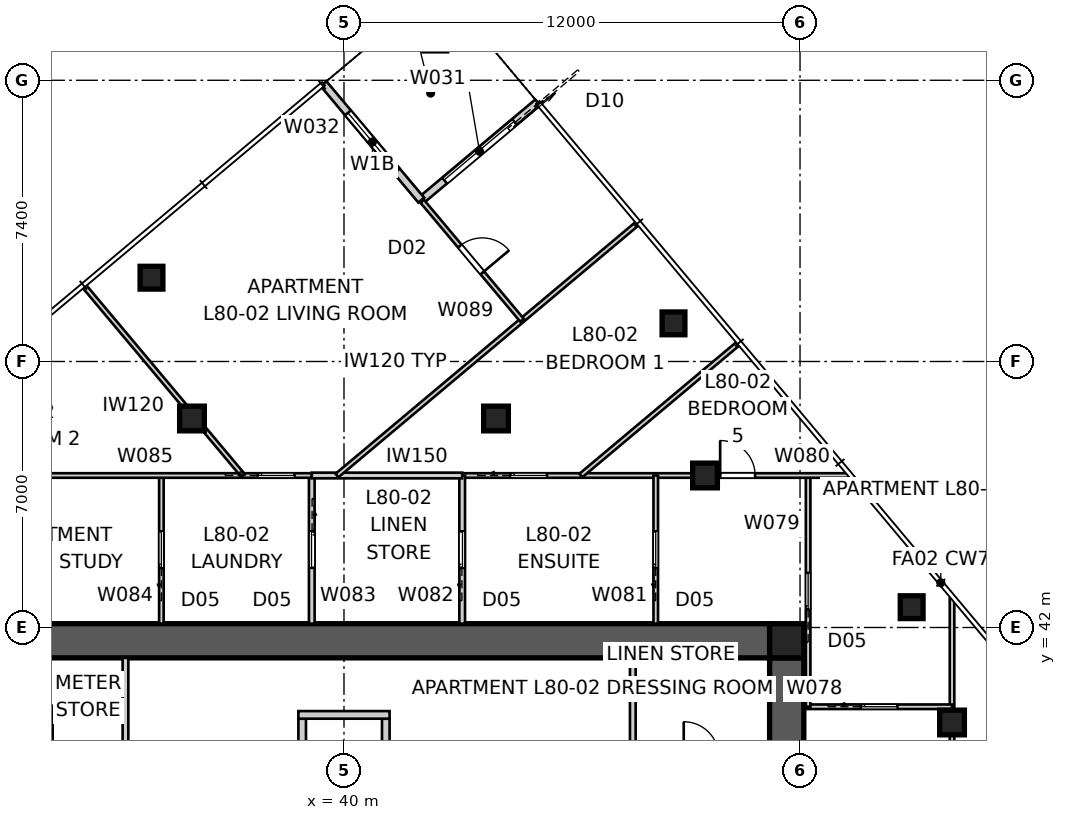
"""IFC4 building model, lengths in metres.
Left out: names, types, materials, properties, quantities, classifications, styles, units other than length and angle.
Written with IfcOpenShell. Run it as: python <this file> out.ifc"""

import sys

from ifc_helpers import new_model, si_unit, direction, frame, frame_2d, origin, origin_2d, place, context, subcontext, project, spatial, polyline, rectangle, outline, extrude, element, fill, save


model = new_model("IFC4")
c1 = context("Model", 3, precision=1e-05, world=origin(), true_north=direction((0.0, 1.0)))
c2 = subcontext(c1, "Body", "Model", "MODEL_VIEW")
j1 = project(units=[si_unit("LENGTHUNIT", "METRE"), si_unit("PLANEANGLEUNIT", "RADIAN")], contexts=[c1])
p1 = place(None, origin())
s1 = spatial("IfcSite", under=j1, at=p1, CompositionType="ELEMENT")
p2 = place(p1, origin())
s2 = spatial("IfcBuilding", under=s1, at=p2, CompositionType="ELEMENT")
p3 = place(p2, frame((0.0, 0.0, 289.6)))
s3 = spatial("IfcBuildingStorey", under=s2, at=p3, CompositionType="ELEMENT", Elevation=289.6)
p4 = place(p3, frame((28.8, 41.65, 0.0), z_axis=(0.0, 0.0, 1.0), x_axis=(1.0, 0.0, 0.0)))
e1 = element("IfcWall", 1, at=p4, inside=s3, PredefinedType="SHEAR", context=c2, shape_type="SweptSolid", body=[
    extrude(outline(polyline([(0.0, -0.45), (22.4, -0.45), (22.4, -0.025), (22.85, -0.025), (22.85, 0.025), (22.4, 0.025), (22.4, 0.45), (0.0, 0.45), (0.0, 0.025), (-0.45, 0.025), (-0.45, -0.025), (0.0, -0.025), (0.0, -0.45)])), origin(), (0.0, 0.0, 1.0), 3.4),
])
p5 = place(p3, frame((51.65, 18.8, 0.0), z_axis=(0.0, 0.0, 1.0), x_axis=(0.0, 1.0, 0.0)))
e2 = element("IfcWall", 2, at=p5, inside=s3, PredefinedType="SHEAR", context=c2, shape_type="SweptSolid", body=[
    extrude(outline(polyline([(0.0, -0.45), (22.4, -0.45), (22.4, -0.025), (22.85, -0.025), (22.85, 0.025), (22.4, 0.025), (22.4, 0.45), (0.0, 0.45), (0.0, 0.025), (-0.45, 0.025), (-0.45, -0.025), (0.0, -0.025), (0.0, -0.45)])), origin(), (0.0, 0.0, 1.0), 3.4),
])
p6 = place(p5, frame((11.14, 0.0, 0.0)))
e3 = element("IfcOpeningElement", 3, at=p6, cuts=e2, PredefinedType="OPENING", context=c2, shape_type="SweptSolid", body=[
    extrude(rectangle(XDim=1.02, YDim=2.4, at=frame_2d((0.51, 1.2))), frame((0.0, 0.46, 0.0), z_axis=(0.0, -1.0, 0.0), x_axis=(1.0, 0.0, 0.0)), (0.0, 0.0, 1.0), 0.92),
])
for number, where, z_axis, x_axis in (
    (4, (38.9, 37.6, 0.0), (0.0, 0.0, 1.0), (0.0, 1.0, 0.0)),
    (5, (41.1, 37.6, 0.0), (0.0, 0.0, 1.0), (0.0, 1.0, 0.0)),
):
    element("IfcWall", number, at=place(p3, frame(where, z_axis=z_axis, x_axis=x_axis)), inside=s3, PredefinedType="SOLIDWALL", context=c2, shape_type="SweptSolid", body=[
        extrude(rectangle(XDim=2.0, YDim=0.2, at=frame_2d((1.0, 0.0))), origin(), (0.0, 0.0, 1.0), 3.4),
    ])
p7 = place(p3, frame((38.8, 39.7, 0.0), z_axis=(0.0, 0.0, 1.0), x_axis=(1.0, 0.0, 0.0)))
e6 = element("IfcWall", 6, at=p7, inside=s3, PredefinedType="SOLIDWALL", context=c2, shape_type="SweptSolid", body=[
    extrude(rectangle(XDim=2.4, YDim=0.2, at=frame_2d((1.2, 0.0))), origin(), (0.0, 0.0, 1.0), 3.4),
])
p8 = place(p3, frame((51.65, 41.65, 0.0), z_axis=(0.0, 0.0, 1.0), x_axis=(1.0, 0.0, 0.0)))
e7 = element("IfcColumn", 7, at=p8, inside=s3, PredefinedType="COLUMN", context=c2, shape_type="SweptSolid", body=[
    extrude(rectangle(XDim=0.9, YDim=0.9, at=origin_2d()), origin(), (0.0, 0.0, 1.0), 3.4),
])
for number, where, z_axis, x_axis in (
    (8, (54.938, 42.534, 0.0), (0.0, 0.0, 1.0), (1.0, 0.0, 0.0)),
    (9, (48.671, 50.003, 0.0), (0.0, 0.0, 1.0), (1.0, 0.0, 0.0)),
    (10, (34.935, 51.205, 0.0), (0.0, 0.0, 1.0), (1.0, 0.0, 0.0)),
):
    element("IfcColumn", number, at=place(p3, frame(where, z_axis=z_axis, x_axis=x_axis)), inside=s3, PredefinedType="COLUMN", context=c2, shape_type="SweptSolid", body=[
        extrude(rectangle(XDim=0.6, YDim=0.6, at=origin_2d()), origin(), (0.0, 0.0, 1.0), 3.4),
    ])
for number, where, z_axis, x_axis in (
    (11, (56.0, 39.5, 0.0), (0.0, 0.0, 1.0), (1.0, 0.0, 0.0)),
    (12, (49.5, 46.0, 0.0), (0.0, 0.0, 1.0), (1.0, 0.0, 0.0)),
    (13, (44.0, 47.5, 0.0), (0.0, 0.0, 1.0), (1.0, 0.0, 0.0)),
    (14, (36.0, 47.5, 0.0), (0.0, 0.0, 1.0), (1.0, 0.0, 0.0)),
):
    element("IfcColumn", number, at=place(p3, frame(where, z_axis=z_axis, x_axis=x_axis)), inside=s3, PredefinedType="COLUMN", context=c2, shape_type="SweptSolid", body=[
        extrude(rectangle(XDim=0.65, YDim=0.65, at=origin_2d()), origin(), (0.0, 0.0, 1.0), 3.4),
    ])
p9 = place(p3, frame((45.098, 55.817, 0.0), z_axis=(0.0, 0.0, 1.0), x_axis=(-0.766060656284, -0.642768287094, 0.0)))
e15 = element("IfcWall", 15, at=p9, inside=s3, PredefinedType="SOLIDWALL", context=c2, shape_type="SweptSolid", body=[
    extrude(rectangle(XDim=4.0, YDim=0.2, at=frame_2d((2.0, 0.0))), origin(), (0.0, 0.0, 1.0), 3.25),
])
p10 = place(p9, frame((0.8, 0.0, 0.0)))
e16 = element("IfcOpeningElement", 16, at=p10, cuts=e15, PredefinedType="OPENING", context=c2, shape_type="SweptSolid", body=[
    extrude(rectangle(XDim=2.4, YDim=2.4, at=frame_2d((1.2, 1.2))), frame((0.0, 0.11, 0.0), z_axis=(0.0, -1.0, 0.0), x_axis=(1.0, 0.0, 0.0)), (0.0, 0.0, 1.0), 0.22),
])
p11 = place(p3, frame((42.034, 53.246, 0.0), z_axis=(0.0, 0.0, 1.0), x_axis=(-0.642798342015, 0.766035437498, 0.0)))
e17 = element("IfcWall", 17, at=p11, inside=s3, PredefinedType="SOLIDWALL", context=c2, shape_type="SweptSolid", body=[
    extrude(rectangle(XDim=4.0, YDim=0.2, at=frame_2d((2.0, 0.0))), origin(), (0.0, 0.0, 1.0), 3.25),
])
p12 = place(p11, frame((1.0, 0.0, 0.45)))
e18 = element("IfcOpeningElement", 18, at=p12, cuts=e17, PredefinedType="OPENING", context=c2, shape_type="SweptSolid", body=[
    extrude(rectangle(XDim=2.0, YDim=1.8, at=frame_2d((1.0, 0.9))), frame((0.0, 0.11, 0.0), z_axis=(0.0, -1.0, 0.0), x_axis=(1.0, 0.0, 0.0)), (0.0, 0.0, 1.0), 0.22),
])
p13 = place(p3, frame((34.25, 41.2, 0.0), z_axis=(0.0, 0.0, 1.0), x_axis=(0.0, -1.0, 0.0)))
e19 = element("IfcWall", 19, at=p13, inside=s3, PredefinedType="SOLIDWALL", context=c2, shape_type="SweptSolid", body=[
    extrude(rectangle(XDim=5.95, YDim=0.15, at=frame_2d((2.975, 0.0))), origin(), (0.0, 0.0, 1.0), 3.25),
])
p14 = place(p13, frame((2.515, 0.0, 0.0)))
e20 = element("IfcOpeningElement", 20, at=p14, cuts=e19, PredefinedType="OPENING", context=c2, shape_type="SweptSolid", body=[
    extrude(rectangle(XDim=0.92, YDim=2.1, at=frame_2d((0.46, 1.05))), frame((0.0, 0.085, 0.0), z_axis=(0.0, -1.0, 0.0), x_axis=(1.0, 0.0, 0.0)), (0.0, 0.0, 1.0), 0.17),
])
p15 = place(p3, frame((47.6, 41.2, 0.0), z_axis=(0.0, 0.0, 1.0), x_axis=(0.0, -1.0, 0.0)))
e21 = element("IfcWall", 21, at=p15, inside=s3, PredefinedType="SOLIDWALL", context=c2, shape_type="SweptSolid", body=[
    extrude(rectangle(XDim=5.9, YDim=0.15, at=frame_2d((2.95, 0.0))), origin(), (0.0, 0.0, 1.0), 3.25),
])
p16 = place(p3, frame((56.0, 42.762, 0.0), z_axis=(0.0, 0.0, 1.0), x_axis=(0.0, -1.0, 0.0)))
e22 = element("IfcWall", 22, at=p16, inside=s3, PredefinedType="PARTITIONING", context=c2, shape_type="SweptSolid", body=[
    extrude(rectangle(XDim=18.995, YDim=0.12, at=frame_2d((9.498, 0.0))), origin(), (0.0, 0.0, 1.0), 2.55),
])
p17 = place(p16, frame((17.238, 0.0, 0.0)))
e23 = element("IfcOpeningElement", 23, at=p17, cuts=e22, PredefinedType="OPENING", context=c2, shape_type="SweptSolid", body=[
    extrude(rectangle(XDim=0.92, YDim=2.34, at=frame_2d((0.46, 1.17))), frame((0.0, 0.07, 0.0), z_axis=(0.0, -1.0, 0.0), x_axis=(1.0, 0.0, 0.0)), (0.0, 0.0, 1.0), 0.14),
])
p18 = place(p16, frame((6.017, 0.0, 0.0)))
e24 = element("IfcOpeningElement", 24, at=p18, cuts=e22, PredefinedType="OPENING", context=c2, shape_type="SweptSolid", body=[
    extrude(rectangle(XDim=0.92, YDim=2.34, at=frame_2d((0.46, 1.17))), frame((0.0, 0.07, 0.0), z_axis=(0.0, -1.0, 0.0), x_axis=(1.0, 0.0, 0.0)), (0.0, 0.0, 1.0), 0.14),
])
p19 = place(p3, frame((52.163, 39.914, 0.0), z_axis=(0.0, 0.0, 1.0), x_axis=(1.0, 0.0, 0.0)))
e25 = element("IfcWall", 25, at=p19, inside=s3, PredefinedType="PARTITIONING", context=c2, shape_type="SweptSolid", body=[
    extrude(rectangle(XDim=3.837, YDim=0.12, at=frame_2d((1.918, 0.0))), origin(), (0.0, 0.0, 1.0), 3.25),
])
p20 = place(p19, frame((1.438, 0.0, 0.0)))
e26 = element("IfcOpeningElement", 26, at=p20, cuts=e25, PredefinedType="OPENING", context=c2, shape_type="SweptSolid", body=[
    extrude(rectangle(XDim=0.96, YDim=2.1, at=frame_2d((0.48, 1.05))), frame((0.0, 0.07, 0.0), z_axis=(0.0, -1.0, 0.0), x_axis=(1.0, 0.0, 0.0)), (0.0, 0.0, 1.0), 0.14),
])
p21 = place(p3, frame((52.213, 39.914, 0.0), z_axis=(0.0, 0.0, 1.0), x_axis=(0.0, 1.0, 0.0)))
e27 = element("IfcWall", 27, at=p21, inside=s3, PredefinedType="PARTITIONING", context=c2, shape_type="SweptSolid", body=[
    extrude(rectangle(XDim=6.086, YDim=0.12, at=frame_2d((3.043, 0.0))), origin(), (0.0, 0.0, 1.0), 3.25),
])
p22 = place(p21, frame((2.563, 0.0, 0.0)))
e28 = element("IfcOpeningElement", 28, at=p22, cuts=e27, PredefinedType="OPENING", context=c2, shape_type="SweptSolid", body=[
    extrude(rectangle(XDim=0.96, YDim=2.1, at=frame_2d((0.48, 1.05))), frame((0.0, 0.07, 0.0), z_axis=(0.0, -1.0, 0.0), x_axis=(1.0, 0.0, 0.0)), (0.0, 0.0, 1.0), 0.14),
])
p23 = place(p3, frame((43.11, 46.0, 0.0), z_axis=(0.0, 0.0, 1.0), x_axis=(1.0, 0.0, 0.0)))
e29 = element("IfcWall", 29, at=p23, inside=s3, PredefinedType="PARTITIONING", context=c2, shape_type="SweptSolid", body=[
    extrude(rectangle(XDim=10.173, YDim=0.12, at=frame_2d((5.086, 0.0))), origin(), (0.0, 0.0, 1.0), 2.55),
])
p24 = place(p23, frame((6.788, 0.0, 0.0)))
e30 = element("IfcOpeningElement", 30, at=p24, cuts=e29, PredefinedType="OPENING", context=c2, shape_type="SweptSolid", body=[
    extrude(rectangle(XDim=0.92, YDim=2.34, at=frame_2d((0.46, 1.17))), frame((0.0, 0.07, 0.0), z_axis=(0.0, -1.0, 0.0), x_axis=(1.0, 0.0, 0.0)), (0.0, 0.0, 1.0), 0.14),
])
p25 = place(p23, frame((1.271, 0.0, 0.0)))
e31 = element("IfcOpeningElement", 31, at=p25, cuts=e29, PredefinedType="OPENING", context=c2, shape_type="SweptSolid", body=[
    extrude(rectangle(XDim=0.96, YDim=2.1, at=frame_2d((0.48, 1.05))), frame((0.0, 0.07, 0.0), z_axis=(0.0, -1.0, 0.0), x_axis=(1.0, 0.0, 0.0)), (0.0, 0.0, 1.0), 0.14),
])
p26 = place(p3, frame((48.203, 42.1, 0.0), z_axis=(0.0, 0.0, 1.0), x_axis=(0.0, 1.0, 0.0)))
e32 = element("IfcWall", 32, at=p26, inside=s3, PredefinedType="PARTITIONING", context=c2, shape_type="SweptSolid", body=[
    extrude(rectangle(XDim=3.9, YDim=0.12, at=frame_2d((1.95, 0.0))), origin(), (0.0, 0.0, 1.0), 3.25),
])
p27 = place(p26, frame((1.47, 0.0, 0.0)))
e33 = element("IfcOpeningElement", 33, at=p27, cuts=e32, PredefinedType="OPENING", context=c2, shape_type="SweptSolid", body=[
    extrude(rectangle(XDim=0.96, YDim=2.1, at=frame_2d((0.48, 1.05))), frame((0.0, 0.07, 0.0), z_axis=(0.0, -1.0, 0.0), x_axis=(1.0, 0.0, 0.0)), (0.0, 0.0, 1.0), 0.14),
])
p28 = place(p3, frame((43.11, 42.1, 0.0), z_axis=(0.0, 0.0, 1.0), x_axis=(0.0, 1.0, 0.0)))
e34 = element("IfcWall", 34, at=p28, inside=s3, PredefinedType="SOLIDWALL", context=c2, shape_type="SweptSolid", body=[
    extrude(rectangle(XDim=3.9, YDim=0.15, at=frame_2d((1.95, 0.0))), origin(), (0.0, 0.0, 1.0), 3.25),
])
p29 = place(p28, frame((1.47, 0.0, 0.0)))
e35 = element("IfcOpeningElement", 35, at=p29, cuts=e34, PredefinedType="OPENING", context=c2, shape_type="SweptSolid", body=[
    extrude(rectangle(XDim=0.96, YDim=2.1, at=frame_2d((0.48, 1.05))), frame((0.0, 0.085, 0.0), z_axis=(0.0, -1.0, 0.0), x_axis=(1.0, 0.0, 0.0)), (0.0, 0.0, 1.0), 0.17),
])
p30 = place(p3, frame((39.153, 46.0, 0.0), z_axis=(0.0, 0.0, 1.0), x_axis=(0.0, -1.0, 0.0)))
e36 = element("IfcWall", 36, at=p30, inside=s3, PredefinedType="SOLIDWALL", context=c2, shape_type="SweptSolid", body=[
    extrude(rectangle(XDim=3.9, YDim=0.15, at=frame_2d((1.95, 0.0))), origin(), (0.0, 0.0, 1.0), 3.25),
])
p31 = place(p30, frame((1.47, 0.0, 0.0)))
e37 = element("IfcOpeningElement", 37, at=p31, cuts=e36, PredefinedType="OPENING", context=c2, shape_type="SweptSolid", body=[
    extrude(rectangle(XDim=0.96, YDim=2.1, at=frame_2d((0.48, 1.05))), frame((0.0, 0.085, 0.0), z_axis=(0.0, -1.0, 0.0), x_axis=(1.0, 0.0, 0.0)), (0.0, 0.0, 1.0), 0.17),
])
p32 = place(p3, frame((35.195, 42.1, 0.0), z_axis=(0.0, 0.0, 1.0), x_axis=(0.0, 1.0, 0.0)))
e38 = element("IfcWall", 38, at=p32, inside=s3, PredefinedType="PARTITIONING", context=c2, shape_type="SweptSolid", body=[
    extrude(rectangle(XDim=3.9, YDim=0.12, at=frame_2d((1.95, 0.0))), origin(), (0.0, 0.0, 1.0), 3.25),
])
p33 = place(p32, frame((1.47, 0.0, 0.0)))
e39 = element("IfcOpeningElement", 39, at=p33, cuts=e38, PredefinedType="OPENING", context=c2, shape_type="SweptSolid", body=[
    extrude(rectangle(XDim=0.96, YDim=2.1, at=frame_2d((0.48, 1.05))), frame((0.0, 0.07, 0.0), z_axis=(0.0, -1.0, 0.0), x_axis=(1.0, 0.0, 0.0)), (0.0, 0.0, 1.0), 0.14),
])
p34 = place(p3, frame((27.238, 46.0, 0.0), z_axis=(0.0, 0.0, 1.0), x_axis=(1.0, 0.0, 0.0)))
e40 = element("IfcWall", 40, at=p34, inside=s3, PredefinedType="PARTITIONING", context=c2, shape_type="SweptSolid", body=[
    extrude(rectangle(XDim=11.915, YDim=0.12, at=frame_2d((5.957, 0.0))), origin(), (0.0, 0.0, 1.0), 2.55),
])
p35 = place(p34, frame((3.637, 0.0, 0.0)))
e41 = element("IfcOpeningElement", 41, at=p35, cuts=e40, PredefinedType="OPENING", context=c2, shape_type="SweptSolid", body=[
    extrude(rectangle(XDim=0.92, YDim=2.34, at=frame_2d((0.46, 1.17))), frame((0.0, 0.07, 0.0), z_axis=(0.0, -1.0, 0.0), x_axis=(1.0, 0.0, 0.0)), (0.0, 0.0, 1.0), 0.14),
])
p36 = place(p34, frame((10.498, 0.0, 0.0)))
e42 = element("IfcOpeningElement", 42, at=p36, cuts=e40, PredefinedType="OPENING", context=c2, shape_type="SweptSolid", body=[
    extrude(rectangle(XDim=0.96, YDim=2.1, at=frame_2d((0.48, 1.05))), frame((0.0, 0.07, 0.0), z_axis=(0.0, -1.0, 0.0), x_axis=(1.0, 0.0, 0.0)), (0.0, 0.0, 1.0), 0.14),
])
p37 = place(p3, frame((39.153, 46.0, 0.0), z_axis=(0.0, 0.0, 1.0), x_axis=(1.0, 0.0, 0.0)))
e43 = element("IfcWall", 43, at=p37, inside=s3, PredefinedType="SOLIDWALL", context=c2, shape_type="SweptSolid", body=[
    extrude(rectangle(XDim=3.958, YDim=0.15, at=frame_2d((1.979, 0.0))), origin(), (0.0, 0.0, 1.0), 3.25),
])
p38 = place(p3, frame((47.719, 52.631, 0.0), z_axis=(0.0, 0.0, 1.0), x_axis=(-0.766052076481, -0.64277851249, 0.0)))
e44 = element("IfcWall", 44, at=p38, inside=s3, PredefinedType="PARTITIONING", context=c2, shape_type="SweptSolid", body=[
    extrude(rectangle(XDim=10.316, YDim=0.12, at=frame_2d((5.158, 0.0))), origin(), (0.0, 0.0, 1.0), 3.25),
])
p39 = place(p3, frame((37.344, 46.0, 0.0), z_axis=(0.0, 0.0, 1.0), x_axis=(-0.642779498388, 0.766051249233, 0.0)))
e45 = element("IfcWall", 45, at=p39, inside=s3, PredefinedType="PARTITIONING", context=c2, shape_type="SweptSolid", body=[
    extrude(rectangle(XDim=6.496, YDim=0.12, at=frame_2d((3.248, 0.0))), origin(), (0.0, 0.0, 1.0), 3.25),
])
p40 = place(p3, frame((42.06, 53.215, 0.0), z_axis=(0.0, 0.0, 1.0), x_axis=(0.642796729538, -0.766036790562, 0.0)))
e46 = element("IfcWall", 46, at=p40, inside=s3, PredefinedType="PARTITIONING", context=c2, shape_type="SweptSolid", body=[
    extrude(rectangle(XDim=4.085, YDim=0.12, at=frame_2d((2.042, 0.0))), origin(), (0.0, 0.0, 1.0), 3.25),
])
p41 = place(p40, frame((1.538, 0.0, 0.0)))
e47 = element("IfcOpeningElement", 47, at=p41, cuts=e46, PredefinedType="OPENING", context=c2, shape_type="SweptSolid", body=[
    extrude(rectangle(XDim=0.92, YDim=2.34, at=frame_2d((0.46, 1.17))), frame((0.0, 0.07, 0.0), z_axis=(0.0, -1.0, 0.0), x_axis=(1.0, 0.0, 0.0)), (0.0, 0.0, 1.0), 0.14),
])
p42 = place(p3, frame((50.37, 49.471, 0.0), z_axis=(0.0, 0.0, 1.0), x_axis=(-0.766056536168, -0.642773197476, 0.0)))
e48 = element("IfcWall", 48, at=p42, inside=s3, PredefinedType="PARTITIONING", context=c2, shape_type="SweptSolid", body=[
    extrude(rectangle(XDim=5.4, YDim=0.12, at=frame_2d((2.7, 0.0))), origin(), (0.0, 0.0, 1.0), 3.25),
])
p43 = place(p10, origin())
e49 = element("IfcDoor", 49, at=p43, inside=s3, OperationType="SLIDING_TO_LEFT", PredefinedType="DOOR", context=c2, shape_type="SweptSolid", body=[
    extrude(rectangle(XDim=2.4, YDim=2.4, at=frame_2d((1.2, 1.2))), frame((0.0, 0.025, 0.0), z_axis=(0.0, -1.0, 0.0), x_axis=(1.0, 0.0, 0.0)), (0.0, 0.0, 1.0), 0.05),
])
fill(e16, e49)
p44 = place(p12, origin())
e50 = element("IfcWindow", 50, at=p44, inside=s3, PartitioningType="SINGLE_PANEL", PredefinedType="WINDOW", context=c2, shape_type="SweptSolid", body=[
    extrude(rectangle(XDim=2.0, YDim=1.8, at=frame_2d((1.0, 0.9))), frame((0.0, 0.03, 0.0), z_axis=(0.0, -1.0, 0.0), x_axis=(1.0, 0.0, 0.0)), (0.0, 0.0, 1.0), 0.06),
])
fill(e18, e50)
p45 = place(p20, origin())
e51 = element("IfcDoor", 51, at=p45, inside=s3, OperationType="SLIDING_TO_LEFT", PredefinedType="DOOR", context=c2, shape_type="SweptSolid", body=[
    extrude(rectangle(XDim=0.96, YDim=2.1, at=frame_2d((0.48, 1.05))), frame((0.0, 0.025, 0.0), z_axis=(0.0, -1.0, 0.0), x_axis=(1.0, 0.0, 0.0)), (0.0, 0.0, 1.0), 0.05),
])
fill(e26, e51)
p46 = place(p22, origin())
e52 = element("IfcDoor", 52, at=p46, inside=s3, OperationType="SLIDING_TO_LEFT", PredefinedType="DOOR", context=c2, shape_type="SweptSolid", body=[
    extrude(rectangle(XDim=0.96, YDim=2.1, at=frame_2d((0.48, 1.05))), frame((0.0, 0.025, 0.0), z_axis=(0.0, -1.0, 0.0), x_axis=(1.0, 0.0, 0.0)), (0.0, 0.0, 1.0), 0.05),
])
fill(e28, e52)
p47 = place(p24, origin())
e53 = element("IfcDoor", 53, at=p47, inside=s3, OperationType="SINGLE_SWING_LEFT", PredefinedType="DOOR", context=c2, shape_type="SweptSolid", body=[
    extrude(rectangle(XDim=0.92, YDim=2.34, at=frame_2d((0.46, 1.17))), frame((0.0, 0.025, 0.0), z_axis=(0.0, -1.0, 0.0), x_axis=(1.0, 0.0, 0.0)), (0.0, 0.0, 1.0), 0.05),
])
fill(e30, e53)
p48 = place(p27, origin())
e54 = element("IfcDoor", 54, at=p48, inside=s3, OperationType="SLIDING_TO_LEFT", PredefinedType="DOOR", context=c2, shape_type="SweptSolid", body=[
    extrude(rectangle(XDim=0.96, YDim=2.1, at=frame_2d((0.48, 1.05))), frame((0.0, 0.025, 0.0), z_axis=(0.0, -1.0, 0.0), x_axis=(1.0, 0.0, 0.0)), (0.0, 0.0, 1.0), 0.05),
])
fill(e33, e54)
p49 = place(p29, origin())
e55 = element("IfcDoor", 55, at=p49, inside=s3, OperationType="SLIDING_TO_LEFT", PredefinedType="DOOR", context=c2, shape_type="SweptSolid", body=[
    extrude(rectangle(XDim=0.96, YDim=2.1, at=frame_2d((0.48, 1.05))), frame((0.0, 0.025, 0.0), z_axis=(0.0, -1.0, 0.0), x_axis=(1.0, 0.0, 0.0)), (0.0, 0.0, 1.0), 0.05),
])
fill(e35, e55)
p50 = place(p25, origin())
e56 = element("IfcDoor", 56, at=p50, inside=s3, OperationType="SLIDING_TO_LEFT", PredefinedType="DOOR", context=c2, shape_type="SweptSolid", body=[
    extrude(rectangle(XDim=0.96, YDim=2.1, at=frame_2d((0.48, 1.05))), frame((0.0, 0.025, 0.0), z_axis=(0.0, -1.0, 0.0), x_axis=(1.0, 0.0, 0.0)), (0.0, 0.0, 1.0), 0.05),
])
fill(e31, e56)
p51 = place(p31, origin())
e57 = element("IfcDoor", 57, at=p51, inside=s3, OperationType="SLIDING_TO_LEFT", PredefinedType="DOOR", context=c2, shape_type="SweptSolid", body=[
    extrude(rectangle(XDim=0.96, YDim=2.1, at=frame_2d((0.48, 1.05))), frame((0.0, 0.025, 0.0), z_axis=(0.0, -1.0, 0.0), x_axis=(1.0, 0.0, 0.0)), (0.0, 0.0, 1.0), 0.05),
])
fill(e37, e57)
p52 = place(p33, origin())
e58 = element("IfcDoor", 58, at=p52, inside=s3, OperationType="SLIDING_TO_LEFT", PredefinedType="DOOR", context=c2, shape_type="SweptSolid", body=[
    extrude(rectangle(XDim=0.96, YDim=2.1, at=frame_2d((0.48, 1.05))), frame((0.0, 0.025, 0.0), z_axis=(0.0, -1.0, 0.0), x_axis=(1.0, 0.0, 0.0)), (0.0, 0.0, 1.0), 0.05),
])
fill(e39, e58)
p53 = place(p36, origin())
e59 = element("IfcDoor", 59, at=p53, inside=s3, OperationType="SLIDING_TO_LEFT", PredefinedType="DOOR", context=c2, shape_type="SweptSolid", body=[
    extrude(rectangle(XDim=0.96, YDim=2.1, at=frame_2d((0.48, 1.05))), frame((0.0, 0.025, 0.0), z_axis=(0.0, -1.0, 0.0), x_axis=(1.0, 0.0, 0.0)), (0.0, 0.0, 1.0), 0.05),
])
fill(e42, e59)
p54 = place(p41, origin())
e60 = element("IfcDoor", 60, at=p54, inside=s3, OperationType="SINGLE_SWING_RIGHT", PredefinedType="DOOR", context=c2, shape_type="SweptSolid", body=[
    extrude(rectangle(XDim=0.92, YDim=2.34, at=frame_2d((0.46, 1.17))), frame((0.0, 0.025, 0.0), z_axis=(0.0, -1.0, 0.0), x_axis=(1.0, 0.0, 0.0)), (0.0, 0.0, 1.0), 0.05),
])
fill(e47, e60)
save(model, sys.argv[1])
